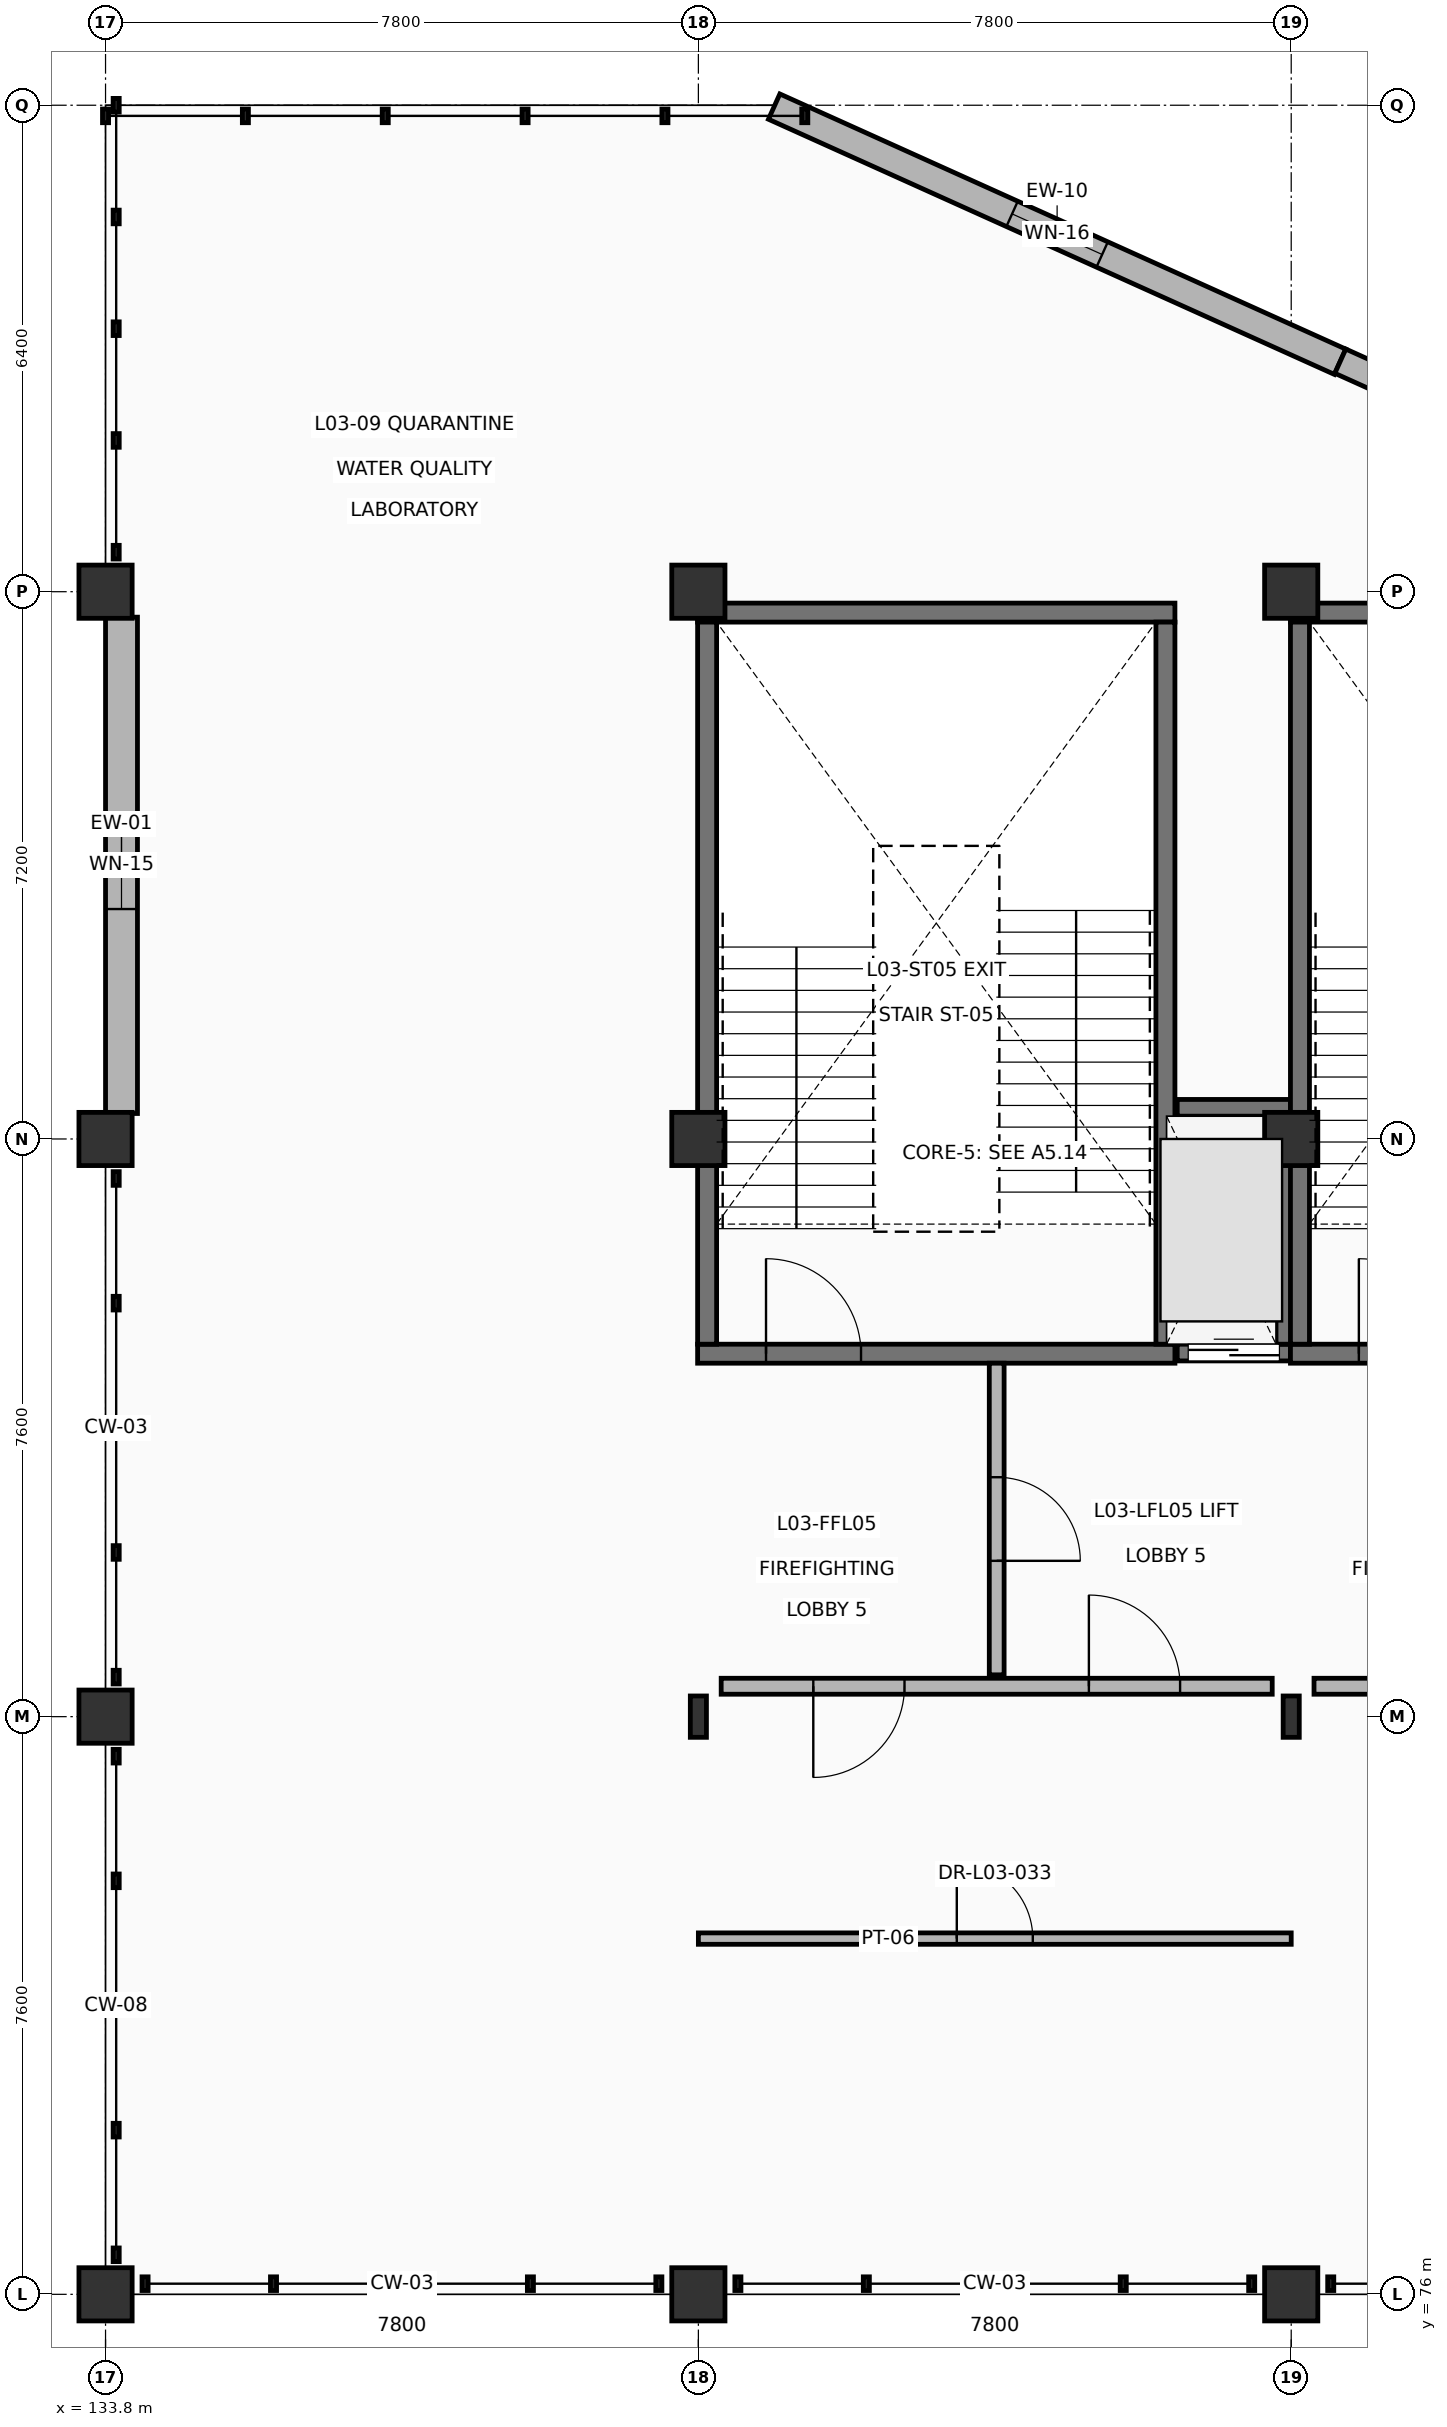
"""IFC4 building model, lengths in metres.
Left out: names, types, materials, properties, quantities, classifications, styles, units other than length and angle.
Written with IfcOpenShell. Run it as: python <this file> out.ifc"""

import sys

from ifc_helpers import new_model, si_unit, direction, frame, frame_2d, origin, origin_2d, place, context, subcontext, project, spatial, rectangle, i_section, extrude, element, fill, save


model = new_model("IFC4")
c1 = context("Model", 3, precision=1e-05, world=origin(), true_north=direction((0.0, 1.0)))
c2 = subcontext(c1, "Body", "Model", "MODEL_VIEW")
j1 = project(units=[si_unit("LENGTHUNIT", "METRE"), si_unit("PLANEANGLEUNIT", "RADIAN")], contexts=[c1])
p1 = place(None, origin())
s1 = spatial("IfcSite", under=j1, at=p1, CompositionType="ELEMENT")
p2 = place(p1, origin())
s2 = spatial("IfcBuilding", under=s1, at=p2, CompositionType="ELEMENT")
p3 = place(p2, frame((0.0, 0.0, 10.5)))
s3 = spatial("IfcBuildingStorey", under=s2, at=p3, CompositionType="ELEMENT", Elevation=10.5)
for number, where, z_axis, x_axis in (
    (1, (133.8, 76.0, 0.0), (0.0, 0.0, 1.0), (1.0, 0.0, 0.0)),
    (2, (133.8, 83.6, 0.0), (0.0, 0.0, 1.0), (1.0, 0.0, 0.0)),
):
    element("IfcColumn", number, at=place(p3, frame(where, z_axis=z_axis, x_axis=x_axis)), inside=s3, PredefinedType="COLUMN", context=c2, shape_type="SweptSolid", body=[
        extrude(rectangle(XDim=0.7, YDim=0.7, at=origin_2d()), origin(), (0.0, 0.0, 1.0), 4.8),
    ])
for number, where, z_axis, x_axis in (
    (3, (133.8, 91.2, 0.0), (0.0, 0.0, 1.0), (1.0, 0.0, 0.0)),
    (4, (133.8, 98.4, 0.0), (0.0, 0.0, 1.0), (1.0, 0.0, 0.0)),
):
    element("IfcColumn", number, at=place(p3, frame(where, z_axis=z_axis, x_axis=x_axis)), inside=s3, PredefinedType="COLUMN", context=c2, shape_type="SweptSolid", body=[
        extrude(rectangle(XDim=0.7, YDim=0.7, at=origin_2d()), origin(), (0.0, 0.0, 1.0), 4.54),
    ])
p4 = place(p3, frame((141.6, 76.0, 0.0), z_axis=(0.0, 0.0, 1.0), x_axis=(1.0, 0.0, 0.0)))
e5 = element("IfcColumn", 5, at=p4, inside=s3, PredefinedType="COLUMN", context=c2, shape_type="SweptSolid", body=[
    extrude(rectangle(XDim=0.7, YDim=0.7, at=origin_2d()), origin(), (0.0, 0.0, 1.0), 4.8),
])
p5 = place(p3, frame((141.6, 83.6, 0.0), z_axis=(0.0, 0.0, 1.0), x_axis=(1.0, 0.0, 0.0)))
e6 = element("IfcColumn", 6, at=p5, inside=s3, PredefinedType="COLUMN", context=c2, shape_type="SweptSolid", body=[
    extrude(i_section(OverallWidth=0.212, OverallDepth=0.544, WebThickness=0.013, FlangeThickness=0.021, at=origin_2d()), origin(), (0.0, 0.0, 1.0), 4.8),
])
for number, where, z_axis, x_axis in (
    (7, (141.6, 91.2, 0.0), (0.0, 0.0, 1.0), (1.0, 0.0, 0.0)),
    (8, (141.6, 98.4, 0.0), (0.0, 0.0, 1.0), (1.0, 0.0, 0.0)),
    (9, (149.4, 76.0, 0.0), (0.0, 0.0, 1.0), (1.0, 0.0, 0.0)),
):
    element("IfcColumn", number, at=place(p3, frame(where, z_axis=z_axis, x_axis=x_axis)), inside=s3, PredefinedType="COLUMN", context=c2, shape_type="SweptSolid", body=[
        extrude(rectangle(XDim=0.7, YDim=0.7, at=origin_2d()), origin(), (0.0, 0.0, 1.0), 4.8),
    ])
p6 = place(p3, frame((149.4, 83.6, 0.0), z_axis=(0.0, 0.0, 1.0), x_axis=(1.0, 0.0, 0.0)))
e10 = element("IfcColumn", 10, at=p6, inside=s3, PredefinedType="COLUMN", context=c2, shape_type="SweptSolid", body=[
    extrude(i_section(OverallWidth=0.212, OverallDepth=0.544, WebThickness=0.013, FlangeThickness=0.021, at=origin_2d()), origin(), (0.0, 0.0, 1.0), 4.8),
])
for number, where, z_axis, x_axis in (
    (11, (149.4, 91.2, 0.0), (0.0, 0.0, 1.0), (1.0, 0.0, 0.0)),
    (12, (149.4, 98.4, 0.0), (0.0, 0.0, 1.0), (1.0, 0.0, 0.0)),
):
    element("IfcColumn", number, at=place(p3, frame(where, z_axis=z_axis, x_axis=x_axis)), inside=s3, PredefinedType="COLUMN", context=c2, shape_type="SweptSolid", body=[
        extrude(rectangle(XDim=0.7, YDim=0.7, at=origin_2d()), origin(), (0.0, 0.0, 1.0), 4.8),
    ])
p7 = place(p3, frame((134.01, 91.535, 0.0), z_axis=(0.0, 0.0, 1.0), x_axis=(0.0, 1.0, 0.0)))
e13 = element("IfcWall", 13, at=p7, inside=s3, PredefinedType="SOLIDWALL", context=c2, shape_type="SweptSolid", body=[
    extrude(rectangle(XDim=6.53, YDim=0.42, at=frame_2d((3.265, 0.0))), origin(), (0.0, 0.0, 1.0), 3.991),
])
p8 = place(p7, frame((2.69, 0.0, 0.95)))
e14 = element("IfcOpeningElement", 14, at=p8, cuts=e13, PredefinedType="OPENING", context=c2, shape_type="SweptSolid", body=[
    extrude(rectangle(XDim=1.15, YDim=1.55, at=frame_2d((0.575, 0.775))), frame((0.0, 0.22, 0.0), z_axis=(0.0, -1.0, 0.0), x_axis=(1.0, 0.0, 0.0)), (0.0, 0.0, 1.0), 0.44),
])
p9 = place(p3, frame((142.597, 104.782, 0.0), z_axis=(0.0, 0.0, 1.0), x_axis=(0.911636609409, -0.410997192674, 0.0)))
e15 = element("IfcWall", 15, at=p9, inside=s3, PredefinedType="SOLIDWALL", context=c2, shape_type="SweptSolid", body=[
    extrude(rectangle(XDim=8.168, YDim=0.365, at=frame_2d((4.084, 0.0))), origin(), (0.0, 0.0, 1.0), 4.56),
])
p10 = place(p9, frame((3.434, 0.0, 0.95)))
e16 = element("IfcOpeningElement", 16, at=p10, cuts=e15, PredefinedType="OPENING", context=c2, shape_type="SweptSolid", body=[
    extrude(rectangle(XDim=1.3, YDim=1.75, at=frame_2d((0.65, 0.875))), frame((0.0, 0.192, 0.0), z_axis=(0.0, -1.0, 0.0), x_axis=(1.0, 0.0, 0.0)), (0.0, 0.0, 1.0), 0.385),
])
p11 = place(p3, frame((150.046, 101.433, 0.0), z_axis=(0.0, 0.0, 1.0), x_axis=(0.911629880324, -0.411012118191, 0.0)))
e17 = element("IfcWall", 17, at=p11, inside=s3, PredefinedType="SOLIDWALL", context=c2, shape_type="SweptSolid", body=[
    extrude(rectangle(XDim=7.321, YDim=0.35, at=frame_2d((3.661, 0.0))), origin(), (0.0, 0.0, 1.0), 4.56),
])
p12 = place(p3, frame((141.59, 88.375, 0.0), z_axis=(0.0, 0.0, 1.0), x_axis=(1.0, 0.0, 0.0)))
e18 = element("IfcWall", 18, at=p12, inside=s3, PredefinedType="SHEAR", context=c2, shape_type="SweptSolid", body=[
    extrude(rectangle(XDim=6.28, YDim=0.25, at=frame_2d((3.14, 0.0))), origin(), (0.0, 0.0, 1.0), 4.54),
])
p13 = place(p12, frame((0.9, 0.0, 0.0)))
e19 = element("IfcOpeningElement", 19, at=p13, cuts=e18, PredefinedType="OPENING", context=c2, shape_type="SweptSolid", body=[
    extrude(rectangle(XDim=1.25, YDim=2.2, at=frame_2d((0.625, 1.1))), frame((0.0, 0.135, 0.0), z_axis=(0.0, -1.0, 0.0), x_axis=(1.0, 0.0, 0.0)), (0.0, 0.0, 1.0), 0.27),
])
p14 = place(p3, frame((141.59, 98.125, 0.0), z_axis=(0.0, 0.0, 1.0), x_axis=(1.0, 0.0, 0.0)))
e20 = element("IfcWall", 20, at=p14, inside=s3, PredefinedType="SHEAR", context=c2, shape_type="SweptSolid", body=[
    extrude(rectangle(XDim=6.28, YDim=0.25, at=frame_2d((3.14, 0.0))), origin(), (0.0, 0.0, 1.0), 4.54),
])
for number, where, z_axis, x_axis in (
    (21, (141.715, 88.5, 0.0), (0.0, 0.0, 1.0), (0.0, 1.0, 0.0)),
    (22, (147.745, 88.5, 0.0), (0.0, 0.0, 1.0), (0.0, 1.0, 0.0)),
):
    element("IfcWall", number, at=place(p3, frame(where, z_axis=z_axis, x_axis=x_axis)), inside=s3, PredefinedType="SHEAR", context=c2, shape_type="SweptSolid", body=[
        extrude(rectangle(XDim=9.5, YDim=0.25, at=frame_2d((4.75, 0.0))), origin(), (0.0, 0.0, 1.0), 4.54),
    ])
p15 = place(p3, frame((147.9, 88.39, 0.0), z_axis=(0.0, 0.0, 1.0), x_axis=(1.0, 0.0, 0.0)))
e23 = element("IfcWall", 23, at=p15, inside=s3, PredefinedType="SHEAR", context=c2, shape_type="SweptSolid", body=[
    extrude(rectangle(XDim=1.49, YDim=0.22, at=frame_2d((0.745, 0.0))), origin(), (0.0, 0.0, 1.0), 4.54),
])
p16 = place(p15, frame((0.145, 0.0, 0.0)))
e24 = element("IfcOpeningElement", 24, at=p16, cuts=e23, PredefinedType="OPENING", context=c2, shape_type="SweptSolid", body=[
    extrude(rectangle(XDim=1.2, YDim=2.2, at=frame_2d((0.6, 1.1))), frame((0.0, 0.12, 0.0), z_axis=(0.0, -1.0, 0.0), x_axis=(1.0, 0.0, 0.0)), (0.0, 0.0, 1.0), 0.24),
])
p17 = place(p3, frame((147.9, 91.61, 0.0), z_axis=(0.0, 0.0, 1.0), x_axis=(1.0, 0.0, 0.0)))
e25 = element("IfcWall", 25, at=p17, inside=s3, PredefinedType="SHEAR", context=c2, shape_type="SweptSolid", body=[
    extrude(rectangle(XDim=1.49, YDim=0.22, at=frame_2d((0.745, 0.0))), origin(), (0.0, 0.0, 1.0), 4.54),
])
p18 = place(p3, frame((149.31, 88.5, 0.0), z_axis=(0.0, 0.0, 1.0), x_axis=(0.0, 1.0, 0.0)))
e26 = element("IfcWall", 26, at=p18, inside=s3, PredefinedType="SHEAR", context=c2, shape_type="SweptSolid", body=[
    extrude(rectangle(XDim=3.0, YDim=0.22, at=frame_2d((1.5, 0.0))), origin(), (0.0, 0.0, 1.0), 4.54),
])
p19 = place(p3, frame((141.9, 84.0, 0.0), z_axis=(0.0, 0.0, 1.0), x_axis=(1.0, 0.0, 0.0)))
e27 = element("IfcWall", 27, at=p19, inside=s3, PredefinedType="PARTITIONING", context=c2, shape_type="SweptSolid", body=[
    extrude(rectangle(XDim=7.25, YDim=0.21, at=frame_2d((3.625, 0.0))), origin(), (0.0, 0.0, 1.0), 4.54),
])
p20 = place(p19, frame((1.212, 0.0, 0.0)))
e28 = element("IfcOpeningElement", 28, at=p20, cuts=e27, PredefinedType="OPENING", context=c2, shape_type="SweptSolid", body=[
    extrude(rectangle(XDim=1.2, YDim=2.2, at=frame_2d((0.6, 1.1))), frame((0.0, 0.115, 0.0), z_axis=(0.0, -1.0, 0.0), x_axis=(1.0, 0.0, 0.0)), (0.0, 0.0, 1.0), 0.23),
])
p21 = place(p19, frame((4.838, 0.0, 0.0)))
e29 = element("IfcOpeningElement", 29, at=p21, cuts=e27, PredefinedType="OPENING", context=c2, shape_type="SweptSolid", body=[
    extrude(rectangle(XDim=1.2, YDim=2.2, at=frame_2d((0.6, 1.1))), frame((0.0, 0.115, 0.0), z_axis=(0.0, -1.0, 0.0), x_axis=(1.0, 0.0, 0.0)), (0.0, 0.0, 1.0), 0.23),
])
p22 = place(p3, frame((145.525, 84.15, 0.0), z_axis=(0.0, 0.0, 1.0), x_axis=(0.0, 1.0, 0.0)))
e30 = element("IfcWall", 30, at=p22, inside=s3, PredefinedType="PARTITIONING", context=c2, shape_type="SweptSolid", body=[
    extrude(rectangle(XDim=4.1, YDim=0.195, at=frame_2d((2.05, 0.0))), origin(), (0.0, 0.0, 1.0), 4.54),
])
p23 = place(p22, frame((1.5, 0.0, 0.0)))
e31 = element("IfcOpeningElement", 31, at=p23, cuts=e30, PredefinedType="OPENING", context=c2, shape_type="SweptSolid", body=[
    extrude(rectangle(XDim=1.1, YDim=2.15, at=frame_2d((0.55, 1.075))), frame((0.0, 0.107, 0.0), z_axis=(0.0, -1.0, 0.0), x_axis=(1.0, 0.0, 0.0)), (0.0, 0.0, 1.0), 0.215),
])
p24 = place(p3, frame((149.39, 88.375, 0.0), z_axis=(0.0, 0.0, 1.0), x_axis=(1.0, 0.0, 0.0)))
e32 = element("IfcWall", 32, at=p24, inside=s3, PredefinedType="SHEAR", context=c2, shape_type="SweptSolid", body=[
    extrude(rectangle(XDim=6.28, YDim=0.25, at=frame_2d((3.14, 0.0))), origin(), (0.0, 0.0, 1.0), 4.54),
])
p25 = place(p24, frame((0.9, 0.0, 0.0)))
e33 = element("IfcOpeningElement", 33, at=p25, cuts=e32, PredefinedType="OPENING", context=c2, shape_type="SweptSolid", body=[
    extrude(rectangle(XDim=1.25, YDim=2.2, at=frame_2d((0.625, 1.1))), frame((0.0, 0.135, 0.0), z_axis=(0.0, -1.0, 0.0), x_axis=(1.0, 0.0, 0.0)), (0.0, 0.0, 1.0), 0.27),
])
p26 = place(p3, frame((149.39, 98.125, 0.0), z_axis=(0.0, 0.0, 1.0), x_axis=(1.0, 0.0, 0.0)))
e34 = element("IfcWall", 34, at=p26, inside=s3, PredefinedType="SHEAR", context=c2, shape_type="SweptSolid", body=[
    extrude(rectangle(XDim=6.28, YDim=0.25, at=frame_2d((3.14, 0.0))), origin(), (0.0, 0.0, 1.0), 4.54),
])
p27 = place(p3, frame((149.515, 88.5, 0.0), z_axis=(0.0, 0.0, 1.0), x_axis=(0.0, 1.0, 0.0)))
e35 = element("IfcWall", 35, at=p27, inside=s3, PredefinedType="SHEAR", context=c2, shape_type="SweptSolid", body=[
    extrude(rectangle(XDim=9.5, YDim=0.25, at=frame_2d((4.75, 0.0))), origin(), (0.0, 0.0, 1.0), 4.54),
])
p28 = place(p3, frame((149.7, 84.0, 0.0), z_axis=(0.0, 0.0, 1.0), x_axis=(1.0, 0.0, 0.0)))
e36 = element("IfcWall", 36, at=p28, inside=s3, PredefinedType="PARTITIONING", context=c2, shape_type="SweptSolid", body=[
    extrude(rectangle(XDim=7.25, YDim=0.21, at=frame_2d((3.625, 0.0))), origin(), (0.0, 0.0, 1.0), 4.54),
])
p29 = place(p28, frame((1.212, 0.0, 0.0)))
e37 = element("IfcOpeningElement", 37, at=p29, cuts=e36, PredefinedType="OPENING", context=c2, shape_type="SweptSolid", body=[
    extrude(rectangle(XDim=1.2, YDim=2.2, at=frame_2d((0.6, 1.1))), frame((0.0, 0.115, 0.0), z_axis=(0.0, -1.0, 0.0), x_axis=(1.0, 0.0, 0.0)), (0.0, 0.0, 1.0), 0.23),
])
p30 = place(p28, frame((4.838, 0.0, 0.0)))
e38 = element("IfcOpeningElement", 38, at=p30, cuts=e36, PredefinedType="OPENING", context=c2, shape_type="SweptSolid", body=[
    extrude(rectangle(XDim=1.2, YDim=2.2, at=frame_2d((0.6, 1.1))), frame((0.0, 0.115, 0.0), z_axis=(0.0, -1.0, 0.0), x_axis=(1.0, 0.0, 0.0)), (0.0, 0.0, 1.0), 0.23),
])
p31 = place(p3, frame((141.6, 80.68, 0.0), z_axis=(0.0, 0.0, 1.0), x_axis=(1.0, 0.0, 0.0)))
e39 = element("IfcWall", 39, at=p31, inside=s3, PredefinedType="PARTITIONING", context=c2, shape_type="SweptSolid", body=[
    extrude(rectangle(XDim=7.8, YDim=0.15, at=frame_2d((3.9, 0.0))), origin(), (0.0, 0.0, 1.0), 3.991),
])
p32 = place(p31, frame((3.4, 0.0, 0.0)))
e40 = element("IfcOpeningElement", 40, at=p32, cuts=e39, PredefinedType="OPENING", context=c2, shape_type="SweptSolid", body=[
    extrude(rectangle(XDim=1.0, YDim=2.15, at=frame_2d((0.5, 1.075))), frame((0.0, 0.085, 0.0), z_axis=(0.0, -1.0, 0.0), x_axis=(1.0, 0.0, 0.0)), (0.0, 0.0, 1.0), 0.17),
])
p33 = place(p8, origin())
e41 = element("IfcWindow", 41, at=p33, inside=s3, PartitioningType="SINGLE_PANEL", PredefinedType="WINDOW", context=c2, shape_type="SweptSolid", body=[
    extrude(rectangle(XDim=1.15, YDim=1.55, at=frame_2d((0.575, 0.775))), frame((0.0, 0.03, 0.0), z_axis=(0.0, -1.0, 0.0), x_axis=(1.0, 0.0, 0.0)), (0.0, 0.0, 1.0), 0.06),
])
fill(e14, e41)
p34 = place(p10, origin())
e42 = element("IfcWindow", 42, at=p34, inside=s3, PartitioningType="SINGLE_PANEL", PredefinedType="WINDOW", context=c2, shape_type="SweptSolid", body=[
    extrude(rectangle(XDim=1.3, YDim=1.75, at=frame_2d((0.65, 0.875))), frame((0.0, 0.03, 0.0), z_axis=(0.0, -1.0, 0.0), x_axis=(1.0, 0.0, 0.0)), (0.0, 0.0, 1.0), 0.06),
])
fill(e16, e42)
p35 = place(p13, origin())
e43 = element("IfcDoor", 43, at=p35, inside=s3, OperationType="SINGLE_SWING_LEFT", PredefinedType="DOOR", context=c2, shape_type="SweptSolid", body=[
    extrude(rectangle(XDim=1.25, YDim=2.2, at=frame_2d((0.625, 1.1))), frame((0.0, 0.025, 0.0), z_axis=(0.0, -1.0, 0.0), x_axis=(1.0, 0.0, 0.0)), (0.0, 0.0, 1.0), 0.05),
])
fill(e19, e43)
p36 = place(p16, origin())
e44 = element("IfcDoor", 44, at=p36, inside=s3, OperationType="DOUBLE_DOOR_SLIDING", PredefinedType="DOOR", context=c2, shape_type="SweptSolid", body=[
    extrude(rectangle(XDim=1.2, YDim=2.2, at=frame_2d((0.6, 1.1))), frame((0.0, 0.025, 0.0), z_axis=(0.0, -1.0, 0.0), x_axis=(1.0, 0.0, 0.0)), (0.0, 0.0, 1.0), 0.05),
])
fill(e24, e44)
p37 = place(p20, origin())
e45 = element("IfcDoor", 45, at=p37, inside=s3, OperationType="SINGLE_SWING_RIGHT", PredefinedType="DOOR", context=c2, shape_type="SweptSolid", body=[
    extrude(rectangle(XDim=1.2, YDim=2.2, at=frame_2d((0.6, 1.1))), frame((0.0, 0.025, 0.0), z_axis=(0.0, -1.0, 0.0), x_axis=(1.0, 0.0, 0.0)), (0.0, 0.0, 1.0), 0.05),
])
fill(e28, e45)
p38 = place(p21, origin())
e46 = element("IfcDoor", 46, at=p38, inside=s3, OperationType="SINGLE_SWING_LEFT", PredefinedType="DOOR", context=c2, shape_type="SweptSolid", body=[
    extrude(rectangle(XDim=1.2, YDim=2.2, at=frame_2d((0.6, 1.1))), frame((0.0, 0.025, 0.0), z_axis=(0.0, -1.0, 0.0), x_axis=(1.0, 0.0, 0.0)), (0.0, 0.0, 1.0), 0.05),
])
fill(e29, e46)
p39 = place(p23, origin())
e47 = element("IfcDoor", 47, at=p39, inside=s3, OperationType="SINGLE_SWING_RIGHT", PredefinedType="DOOR", context=c2, shape_type="SweptSolid", body=[
    extrude(rectangle(XDim=1.1, YDim=2.15, at=frame_2d((0.55, 1.075))), frame((0.0, 0.025, 0.0), z_axis=(0.0, -1.0, 0.0), x_axis=(1.0, 0.0, 0.0)), (0.0, 0.0, 1.0), 0.05),
])
fill(e31, e47)
p40 = place(p25, origin())
e48 = element("IfcDoor", 48, at=p40, inside=s3, OperationType="SINGLE_SWING_LEFT", PredefinedType="DOOR", context=c2, shape_type="SweptSolid", body=[
    extrude(rectangle(XDim=1.25, YDim=2.2, at=frame_2d((0.625, 1.1))), frame((0.0, 0.025, 0.0), z_axis=(0.0, -1.0, 0.0), x_axis=(1.0, 0.0, 0.0)), (0.0, 0.0, 1.0), 0.05),
])
fill(e33, e48)
p41 = place(p32, origin())
e49 = element("IfcDoor", 49, at=p41, inside=s3, OperationType="SINGLE_SWING_LEFT", PredefinedType="DOOR", context=c2, shape_type="SweptSolid", body=[
    extrude(rectangle(XDim=1.0, YDim=2.15, at=frame_2d((0.5, 1.075))), frame((0.0, 0.025, 0.0), z_axis=(0.0, -1.0, 0.0), x_axis=(1.0, 0.0, 0.0)), (0.0, 0.0, 1.0), 0.05),
])
fill(e40, e49)
save(model, sys.argv[1])
